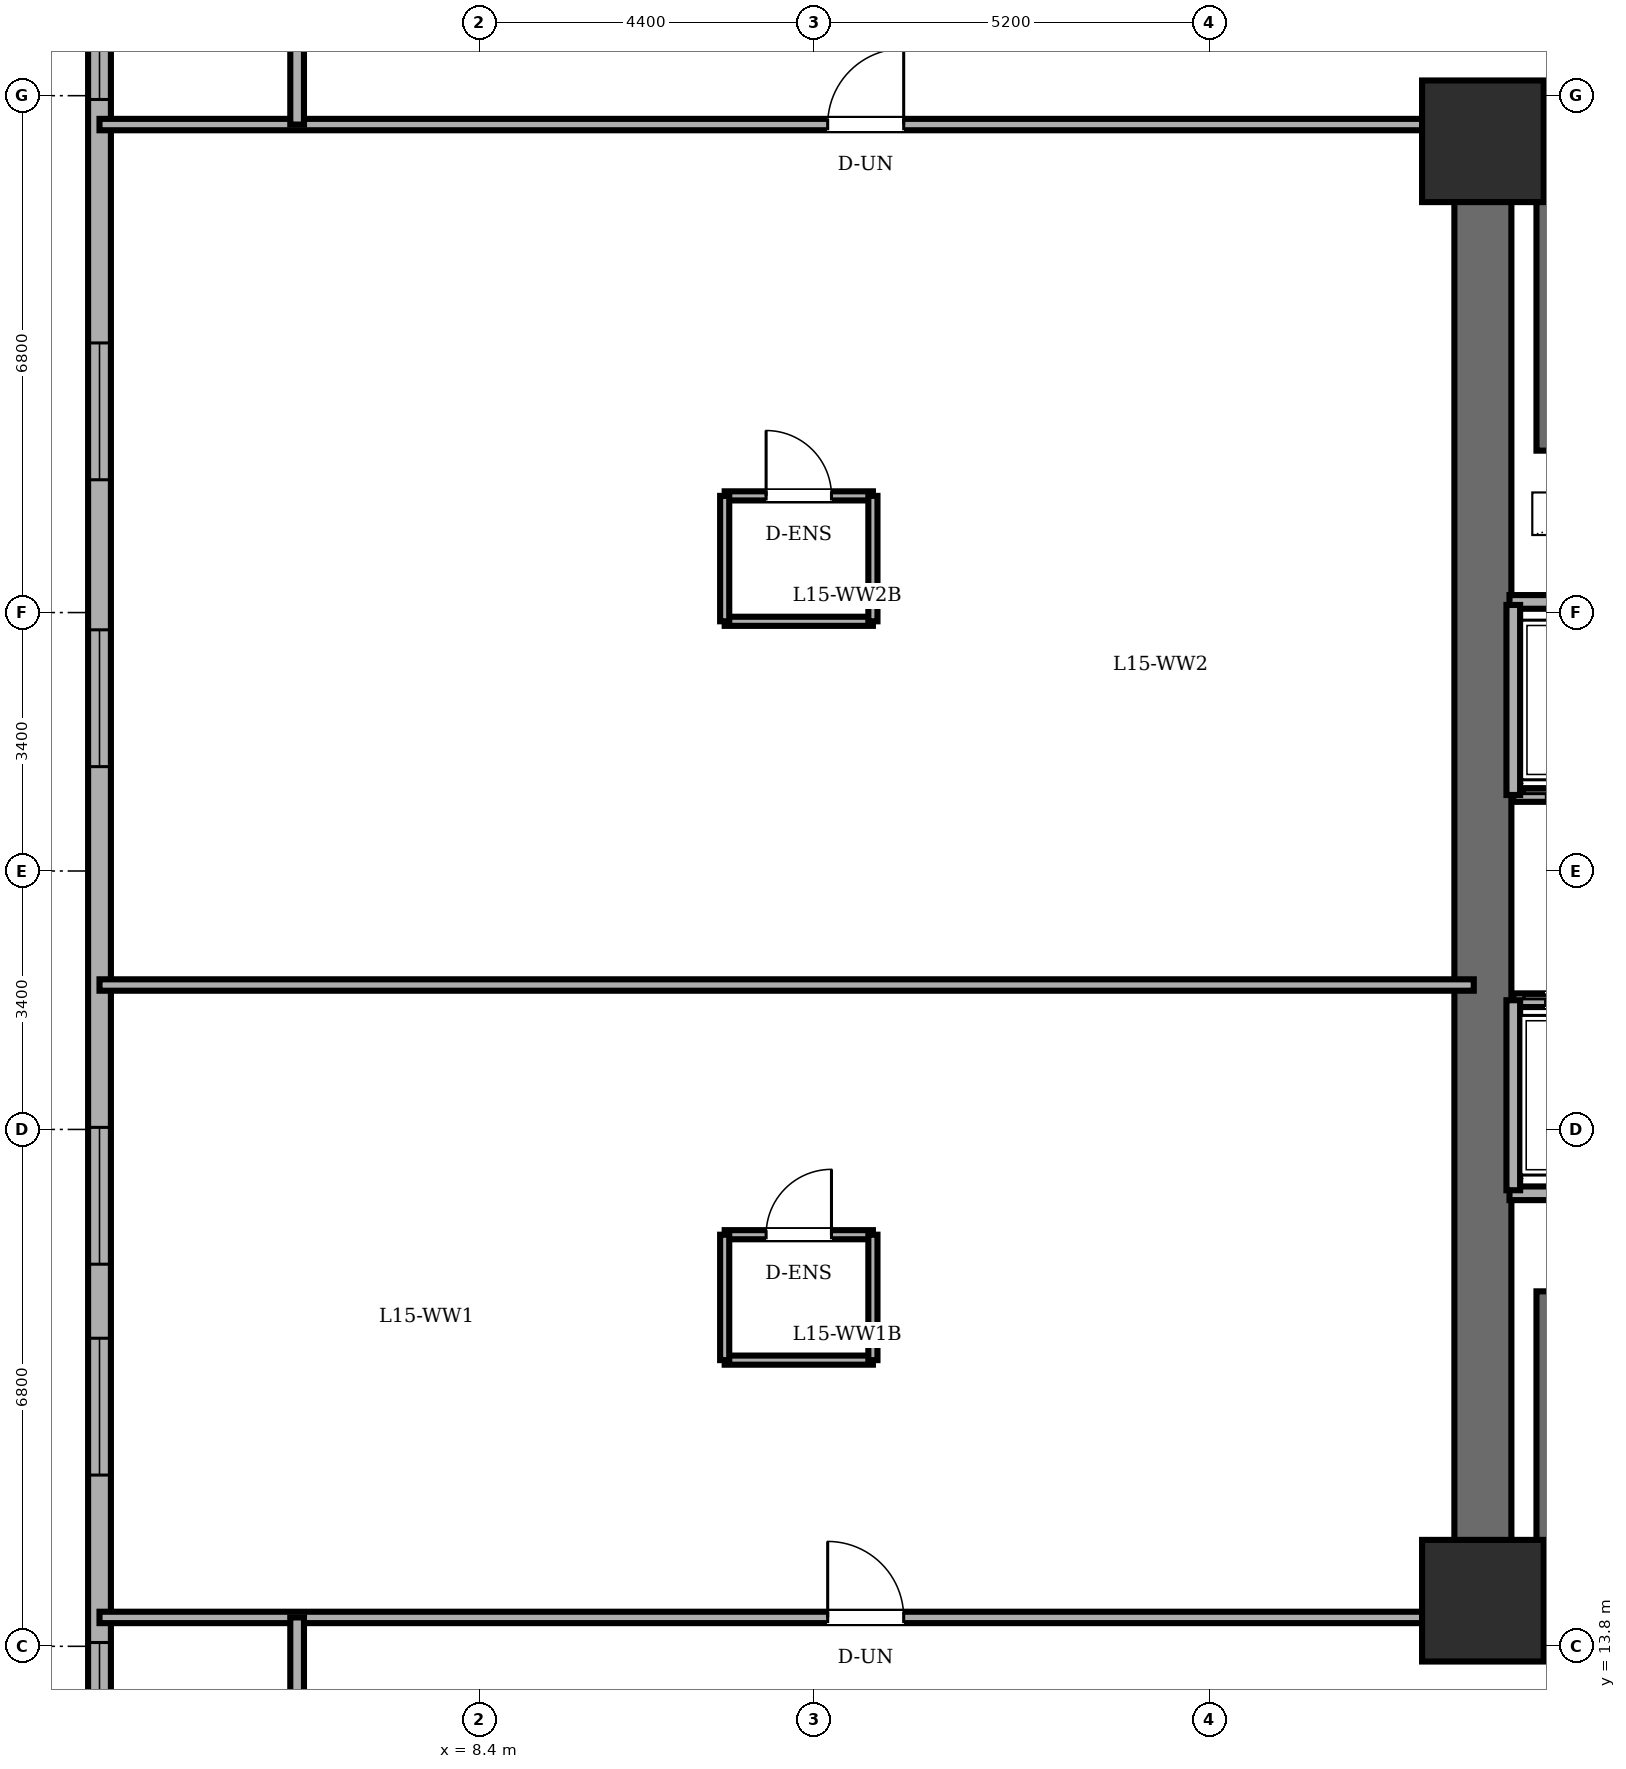
"""IFC4 building model, lengths in metres.
Left out: names, types, materials, properties, quantities, classifications, styles, units other than length and angle.
Written with IfcOpenShell. Run it as: python <this file> out.ifc"""

import sys

from ifc_helpers import new_model, si_unit, direction, frame, frame_2d, origin, origin_2d, place, context, subcontext, project, spatial, rectangle, extrude, element, fill, save


model = new_model("IFC4")
c1 = context("Model", 3, precision=1e-05, world=origin(), true_north=direction((0.0, 1.0)))
c2 = subcontext(c1, "Body", "Model", "MODEL_VIEW")
j1 = project(units=[si_unit("LENGTHUNIT", "METRE"), si_unit("PLANEANGLEUNIT", "RADIAN")], contexts=[c1])
p1 = place(None, origin())
s1 = spatial("IfcSite", under=j1, at=p1, CompositionType="ELEMENT")
p2 = place(p1, origin())
s2 = spatial("IfcBuilding", under=s1, at=p2, CompositionType="ELEMENT")
p3 = place(p2, frame((0.0, 0.0, 57.6)))
s3 = spatial("IfcBuildingStorey", under=s2, at=p3, CompositionType="ELEMENT", Elevation=57.6)
for number, where, z_axis, x_axis in (
    (1, (21.6, 14.4, 0.0), (0.0, 0.0, 1.0), (1.0, 0.0, 0.0)),
    (2, (21.6, 33.6, 0.0), (0.0, 0.0, 1.0), (1.0, 0.0, 0.0)),
):
    element("IfcColumn", number, at=place(p3, frame(where, z_axis=z_axis, x_axis=x_axis)), inside=s3, PredefinedType="COLUMN", context=c2, shape_type="SweptSolid", body=[
        extrude(rectangle(XDim=1.6, YDim=1.6, at=origin_2d()), origin(), (0.0, 0.0, 1.0), 3.6),
    ])
p4 = place(p3, frame((3.4, 40.2, 0.0), z_axis=(0.0, 0.0, 1.0), x_axis=(0.0, -1.0, 0.0)))
e3 = element("IfcWall", 3, at=p4, inside=s3, PredefinedType="SOLIDWALL", context=c2, shape_type="SweptSolid", body=[
    extrude(rectangle(XDim=32.4, YDim=0.3, at=frame_2d((16.2, 0.0))), origin(), (0.0, 0.0, 1.0), 3.4),
])
p5 = place(p4, frame((1.235, 0.0, 0.85)))
e4 = element("IfcOpeningElement", 4, at=p5, cuts=e3, PredefinedType="OPENING", context=c2, shape_type="SweptSolid", body=[
    extrude(rectangle(XDim=1.8, YDim=1.55, at=frame_2d((0.9, 0.775))), frame((0.0, 0.16, 0.0), z_axis=(0.0, -1.0, 0.0), x_axis=(1.0, 0.0, 0.0)), (0.0, 0.0, 1.0), 0.32),
])
p6 = place(p4, frame((4.25, 0.0, 0.85)))
e5 = element("IfcOpeningElement", 5, at=p6, cuts=e3, PredefinedType="OPENING", context=c2, shape_type="SweptSolid", body=[
    extrude(rectangle(XDim=1.8, YDim=1.55, at=frame_2d((0.9, 0.775))), frame((0.0, 0.16, 0.0), z_axis=(0.0, -1.0, 0.0), x_axis=(1.0, 0.0, 0.0)), (0.0, 0.0, 1.0), 0.32),
])
p7 = place(p4, frame((9.253, 0.0, 0.85)))
e6 = element("IfcOpeningElement", 6, at=p7, cuts=e3, PredefinedType="OPENING", context=c2, shape_type="SweptSolid", body=[
    extrude(rectangle(XDim=1.8, YDim=1.55, at=frame_2d((0.9, 0.775))), frame((0.0, 0.16, 0.0), z_axis=(0.0, -1.0, 0.0), x_axis=(1.0, 0.0, 0.0)), (0.0, 0.0, 1.0), 0.32),
])
p8 = place(p4, frame((13.027, 0.0, 0.85)))
e7 = element("IfcOpeningElement", 7, at=p8, cuts=e3, PredefinedType="OPENING", context=c2, shape_type="SweptSolid", body=[
    extrude(rectangle(XDim=1.8, YDim=1.55, at=frame_2d((0.9, 0.775))), frame((0.0, 0.16, 0.0), z_axis=(0.0, -1.0, 0.0), x_axis=(1.0, 0.0, 0.0)), (0.0, 0.0, 1.0), 0.32),
])
p9 = place(p4, frame((19.573, 0.0, 0.85)))
e8 = element("IfcOpeningElement", 8, at=p9, cuts=e3, PredefinedType="OPENING", context=c2, shape_type="SweptSolid", body=[
    extrude(rectangle(XDim=1.8, YDim=1.55, at=frame_2d((0.9, 0.775))), frame((0.0, 0.16, 0.0), z_axis=(0.0, -1.0, 0.0), x_axis=(1.0, 0.0, 0.0)), (0.0, 0.0, 1.0), 0.32),
])
p10 = place(p4, frame((22.347, 0.0, 0.85)))
e9 = element("IfcOpeningElement", 9, at=p10, cuts=e3, PredefinedType="OPENING", context=c2, shape_type="SweptSolid", body=[
    extrude(rectangle(XDim=1.8, YDim=1.55, at=frame_2d((0.9, 0.775))), frame((0.0, 0.16, 0.0), z_axis=(0.0, -1.0, 0.0), x_axis=(1.0, 0.0, 0.0)), (0.0, 0.0, 1.0), 0.32),
])
p11 = place(p4, frame((26.35, 0.0, 0.85)))
e10 = element("IfcOpeningElement", 10, at=p11, cuts=e3, PredefinedType="OPENING", context=c2, shape_type="SweptSolid", body=[
    extrude(rectangle(XDim=1.8, YDim=1.55, at=frame_2d((0.9, 0.775))), frame((0.0, 0.16, 0.0), z_axis=(0.0, -1.0, 0.0), x_axis=(1.0, 0.0, 0.0)), (0.0, 0.0, 1.0), 0.32),
])
p12 = place(p4, frame((29.365, 0.0, 0.85)))
e11 = element("IfcOpeningElement", 11, at=p12, cuts=e3, PredefinedType="OPENING", context=c2, shape_type="SweptSolid", body=[
    extrude(rectangle(XDim=1.8, YDim=1.55, at=frame_2d((0.9, 0.775))), frame((0.0, 0.16, 0.0), z_axis=(0.0, -1.0, 0.0), x_axis=(1.0, 0.0, 0.0)), (0.0, 0.0, 1.0), 0.32),
])
p13 = place(p3, frame((21.6, 14.4, 0.0), z_axis=(0.0, 0.0, 1.0), x_axis=(0.0, 1.0, 0.0)))
e12 = element("IfcWall", 12, at=p13, inside=s3, PredefinedType="SHEAR", context=c2, shape_type="SweptSolid", body=[
    extrude(rectangle(XDim=19.2, YDim=0.75, at=frame_2d((9.6, 0.0))), origin(), (0.0, 0.0, 1.0), 3.4),
])
for number, where, z_axis, x_axis in (
    (13, (21.6, 33.6, 0.0), (0.0, 0.0, 1.0), (1.0, 0.0, 0.0)),
    (14, (37.2, 14.4, 0.0), (0.0, 0.0, 1.0), (-1.0, 0.0, 0.0)),
):
    element("IfcWall", number, at=place(p3, frame(where, z_axis=z_axis, x_axis=x_axis)), inside=s3, PredefinedType="SHEAR", context=c2, shape_type="SweptSolid", body=[
        extrude(rectangle(XDim=15.6, YDim=0.75, at=frame_2d((7.8, 0.0))), origin(), (0.0, 0.0, 1.0), 3.4),
    ])
for number, where, z_axis, x_axis in (
    (15, (22.48, 29.53, 0.0), (0.0, 0.0, 1.0), (0.0, 1.0, 0.0)),
    (16, (22.48, 14.89, 0.0), (0.0, 0.0, 1.0), (0.0, 1.0, 0.0)),
):
    element("IfcWall", number, at=place(p3, frame(where, z_axis=z_axis, x_axis=x_axis)), inside=s3, PredefinedType="SOLIDWALL", context=c2, shape_type="SweptSolid", body=[
        extrude(rectangle(XDim=3.58, YDim=0.35, at=frame_2d((1.79, 0.0))), origin(), (0.0, 0.0, 1.0), 3.4),
    ])
p14 = place(p3, frame((21.95, 27.54, 0.0), z_axis=(0.0, 0.0, 1.0), x_axis=(1.0, 0.0, 0.0)))
e17 = element("IfcWall", 17, at=p14, inside=s3, PredefinedType="PARTITIONING", context=c2, shape_type="SweptSolid", body=[
    extrude(rectangle(XDim=10.56, YDim=0.18, at=frame_2d((5.28, 0.0))), origin(), (0.0, 0.0, 1.0), 3.4),
])
p15 = place(p3, frame((21.95, 19.76, 0.0), z_axis=(0.0, 0.0, 1.0), x_axis=(1.0, 0.0, 0.0)))
e18 = element("IfcWall", 18, at=p15, inside=s3, PredefinedType="PARTITIONING", context=c2, shape_type="SweptSolid", body=[
    extrude(rectangle(XDim=14.87, YDim=0.18, at=frame_2d((7.435, 0.0))), origin(), (0.0, 0.0, 1.0), 3.4),
])
p16 = place(p3, frame((24.02, 25.0, 0.0), z_axis=(0.0, 0.0, 1.0), x_axis=(-1.0, 0.0, 0.0)))
e19 = element("IfcWall", 19, at=p16, inside=s3, PredefinedType="PARTITIONING", context=c2, shape_type="SweptSolid", body=[
    extrude(rectangle(XDim=2.02, YDim=0.18, at=frame_2d((1.01, 0.0))), origin(), (0.0, 0.0, 1.0), 3.4),
])
p17 = place(p16, frame((0.435, 0.0, 0.0)))
e20 = element("IfcOpeningElement", 20, at=p17, cuts=e19, PredefinedType="OPENING", context=c2, shape_type="SweptSolid", body=[
    extrude(rectangle(XDim=1.15, YDim=2.2, at=frame_2d((0.575, 1.1))), frame((0.0, 0.1, 0.0), z_axis=(0.0, -1.0, 0.0), x_axis=(1.0, 0.0, 0.0)), (0.0, 0.0, 1.0), 0.2),
])
p18 = place(p3, frame((22.0, 27.5, 0.0), z_axis=(0.0, 0.0, 1.0), x_axis=(0.0, -1.0, 0.0)))
e21 = element("IfcWall", 21, at=p18, inside=s3, PredefinedType="PARTITIONING", context=c2, shape_type="SweptSolid", body=[
    extrude(rectangle(XDim=2.5, YDim=0.18, at=frame_2d((1.25, 0.0))), origin(), (0.0, 0.0, 1.0), 3.4),
])
p19 = place(p3, frame((22.0, 22.3, 0.0), z_axis=(0.0, 0.0, 1.0), x_axis=(1.0, 0.0, 0.0)))
e22 = element("IfcWall", 22, at=p19, inside=s3, PredefinedType="PARTITIONING", context=c2, shape_type="SweptSolid", body=[
    extrude(rectangle(XDim=2.0, YDim=0.18, at=frame_2d((1.0, 0.0))), origin(), (0.0, 0.0, 1.0), 3.4),
])
p20 = place(p19, frame((0.425, 0.0, 0.0)))
e23 = element("IfcOpeningElement", 23, at=p20, cuts=e22, PredefinedType="OPENING", context=c2, shape_type="SweptSolid", body=[
    extrude(rectangle(XDim=1.15, YDim=2.2, at=frame_2d((0.575, 1.1))), frame((0.0, 0.1, 0.0), z_axis=(0.0, -1.0, 0.0), x_axis=(1.0, 0.0, 0.0)), (0.0, 0.0, 1.0), 0.2),
])
p21 = place(p3, frame((22.0, 22.3, 0.0), z_axis=(0.0, 0.0, 1.0), x_axis=(0.0, -1.0, 0.0)))
e24 = element("IfcWall", 24, at=p21, inside=s3, PredefinedType="PARTITIONING", context=c2, shape_type="SweptSolid", body=[
    extrude(rectangle(XDim=2.5, YDim=0.18, at=frame_2d((1.25, 0.0))), origin(), (0.0, 0.0, 1.0), 3.4),
])
p22 = place(p3, frame((11.625, 19.215, 0.0), z_axis=(0.0, 0.0, 1.0), x_axis=(1.0, 0.0, 0.0)))
e25 = element("IfcWall", 25, at=p22, inside=s3, PredefinedType="PARTITIONING", context=c2, shape_type="SweptSolid", body=[
    extrude(rectangle(XDim=1.95, YDim=0.12, at=frame_2d((0.975, 0.0))), origin(), (0.0, 0.0, 1.0), 3.4),
])
p23 = place(p22, frame((0.545, 0.0, 0.0)))
e26 = element("IfcOpeningElement", 26, at=p23, cuts=e25, PredefinedType="OPENING", context=c2, shape_type="SweptSolid", body=[
    extrude(rectangle(XDim=0.86, YDim=2.1, at=frame_2d((0.43, 1.05))), frame((0.0, 0.07, 0.0), z_axis=(0.0, -1.0, 0.0), x_axis=(1.0, 0.0, 0.0)), (0.0, 0.0, 1.0), 0.14),
])
p24 = place(p3, frame((13.575, 17.565, 0.0), z_axis=(0.0, 0.0, 1.0), x_axis=(-1.0, 0.0, 0.0)))
e27 = element("IfcWall", 27, at=p24, inside=s3, PredefinedType="PARTITIONING", context=c2, shape_type="SweptSolid", body=[
    extrude(rectangle(XDim=1.95, YDim=0.12, at=frame_2d((0.975, 0.0))), origin(), (0.0, 0.0, 1.0), 3.4),
])
for number, where, z_axis, x_axis in (
    (28, (11.625, 19.215, 0.0), (0.0, 0.0, 1.0), (0.0, -1.0, 0.0)),
    (29, (13.575, 17.565, 0.0), (0.0, 0.0, 1.0), (0.0, 1.0, 0.0)),
):
    element("IfcWall", number, at=place(p3, frame(where, z_axis=z_axis, x_axis=x_axis)), inside=s3, PredefinedType="PARTITIONING", context=c2, shape_type="SweptSolid", body=[
        extrude(rectangle(XDim=1.65, YDim=0.12, at=frame_2d((0.825, 0.0))), origin(), (0.0, 0.0, 1.0), 3.4),
    ])
p25 = place(p3, frame((11.625, 28.935, 0.0), z_axis=(0.0, 0.0, 1.0), x_axis=(1.0, 0.0, 0.0)))
e30 = element("IfcWall", 30, at=p25, inside=s3, PredefinedType="PARTITIONING", context=c2, shape_type="SweptSolid", body=[
    extrude(rectangle(XDim=1.95, YDim=0.12, at=frame_2d((0.975, 0.0))), origin(), (0.0, 0.0, 1.0), 3.4),
])
p26 = place(p25, frame((0.545, 0.0, 0.0)))
e31 = element("IfcOpeningElement", 31, at=p26, cuts=e30, PredefinedType="OPENING", context=c2, shape_type="SweptSolid", body=[
    extrude(rectangle(XDim=0.86, YDim=2.1, at=frame_2d((0.43, 1.05))), frame((0.0, 0.07, 0.0), z_axis=(0.0, -1.0, 0.0), x_axis=(1.0, 0.0, 0.0)), (0.0, 0.0, 1.0), 0.14),
])
p27 = place(p3, frame((13.575, 27.285, 0.0), z_axis=(0.0, 0.0, 1.0), x_axis=(-1.0, 0.0, 0.0)))
e32 = element("IfcWall", 32, at=p27, inside=s3, PredefinedType="PARTITIONING", context=c2, shape_type="SweptSolid", body=[
    extrude(rectangle(XDim=1.95, YDim=0.12, at=frame_2d((0.975, 0.0))), origin(), (0.0, 0.0, 1.0), 3.4),
])
for number, where, z_axis, x_axis in (
    (33, (11.625, 28.935, 0.0), (0.0, 0.0, 1.0), (0.0, -1.0, 0.0)),
    (34, (13.575, 27.285, 0.0), (0.0, 0.0, 1.0), (0.0, 1.0, 0.0)),
):
    element("IfcWall", number, at=place(p3, frame(where, z_axis=z_axis, x_axis=x_axis)), inside=s3, PredefinedType="PARTITIONING", context=c2, shape_type="SweptSolid", body=[
        extrude(rectangle(XDim=1.65, YDim=0.12, at=frame_2d((0.825, 0.0))), origin(), (0.0, 0.0, 1.0), 3.4),
    ])
p28 = place(p3, frame((3.4, 14.18, 0.0), z_axis=(0.0, 0.0, 1.0), x_axis=(1.0, 0.0, 0.0)))
e35 = element("IfcWall", 35, at=p28, inside=s3, PredefinedType="PARTITIONING", context=c2, shape_type="SweptSolid", body=[
    extrude(rectangle(XDim=18.08, YDim=0.15, at=frame_2d((9.04, 0.0))), origin(), (0.0, 0.0, 1.0), 3.4),
])
p29 = place(p28, frame((9.58, 0.0, 0.0)))
e36 = element("IfcOpeningElement", 36, at=p29, cuts=e35, PredefinedType="OPENING", context=c2, shape_type="SweptSolid", body=[
    extrude(rectangle(XDim=1.0, YDim=2.15, at=frame_2d((0.5, 1.075))), frame((0.0, 0.085, 0.0), z_axis=(0.0, -1.0, 0.0), x_axis=(1.0, 0.0, 0.0)), (0.0, 0.0, 1.0), 0.17),
])
p30 = place(p3, frame((3.4, 22.5, 0.0), z_axis=(0.0, 0.0, 1.0), x_axis=(1.0, 0.0, 0.0)))
e37 = element("IfcWall", 37, at=p30, inside=s3, PredefinedType="PARTITIONING", context=c2, shape_type="SweptSolid", body=[
    extrude(rectangle(XDim=18.08, YDim=0.15, at=frame_2d((9.04, 0.0))), origin(), (0.0, 0.0, 1.0), 3.4),
])
p31 = place(p3, frame((3.4, 33.82, 0.0), z_axis=(0.0, 0.0, 1.0), x_axis=(1.0, 0.0, 0.0)))
e38 = element("IfcWall", 38, at=p31, inside=s3, PredefinedType="PARTITIONING", context=c2, shape_type="SweptSolid", body=[
    extrude(rectangle(XDim=18.08, YDim=0.15, at=frame_2d((9.04, 0.0))), origin(), (0.0, 0.0, 1.0), 3.4),
])
p32 = place(p31, frame((9.58, 0.0, 0.0)))
e39 = element("IfcOpeningElement", 39, at=p32, cuts=e38, PredefinedType="OPENING", context=c2, shape_type="SweptSolid", body=[
    extrude(rectangle(XDim=1.0, YDim=2.15, at=frame_2d((0.5, 1.075))), frame((0.0, 0.085, 0.0), z_axis=(0.0, -1.0, 0.0), x_axis=(1.0, 0.0, 0.0)), (0.0, 0.0, 1.0), 0.17),
])
for number, where, z_axis, x_axis in (
    (40, (6.0, 11.72, 0.0), (0.0, 0.0, 1.0), (0.0, 1.0, 0.0)),
    (41, (6.0, 33.82, 0.0), (0.0, 0.0, 1.0), (0.0, 1.0, 0.0)),
):
    element("IfcWall", number, at=place(p3, frame(where, z_axis=z_axis, x_axis=x_axis)), inside=s3, PredefinedType="PARTITIONING", context=c2, shape_type="SweptSolid", body=[
        extrude(rectangle(XDim=2.46, YDim=0.18, at=frame_2d((1.23, 0.0))), origin(), (0.0, 0.0, 1.0), 3.4),
    ])
p33 = place(p6, origin())
e42 = element("IfcWindow", 42, at=p33, inside=s3, PartitioningType="DOUBLE_PANEL_VERTICAL", PredefinedType="WINDOW", context=c2, shape_type="SweptSolid", body=[
    extrude(rectangle(XDim=1.8, YDim=1.55, at=frame_2d((0.9, 0.775))), frame((0.0, 0.03, 0.0), z_axis=(0.0, -1.0, 0.0), x_axis=(1.0, 0.0, 0.0)), (0.0, 0.0, 1.0), 0.06),
])
fill(e5, e42)
p34 = place(p7, origin())
e43 = element("IfcWindow", 43, at=p34, inside=s3, PartitioningType="DOUBLE_PANEL_VERTICAL", PredefinedType="WINDOW", context=c2, shape_type="SweptSolid", body=[
    extrude(rectangle(XDim=1.8, YDim=1.55, at=frame_2d((0.9, 0.775))), frame((0.0, 0.03, 0.0), z_axis=(0.0, -1.0, 0.0), x_axis=(1.0, 0.0, 0.0)), (0.0, 0.0, 1.0), 0.06),
])
fill(e6, e43)
p35 = place(p8, origin())
e44 = element("IfcWindow", 44, at=p35, inside=s3, PartitioningType="DOUBLE_PANEL_VERTICAL", PredefinedType="WINDOW", context=c2, shape_type="SweptSolid", body=[
    extrude(rectangle(XDim=1.8, YDim=1.55, at=frame_2d((0.9, 0.775))), frame((0.0, 0.03, 0.0), z_axis=(0.0, -1.0, 0.0), x_axis=(1.0, 0.0, 0.0)), (0.0, 0.0, 1.0), 0.06),
])
fill(e7, e44)
p36 = place(p9, origin())
e45 = element("IfcWindow", 45, at=p36, inside=s3, PartitioningType="DOUBLE_PANEL_VERTICAL", PredefinedType="WINDOW", context=c2, shape_type="SweptSolid", body=[
    extrude(rectangle(XDim=1.8, YDim=1.55, at=frame_2d((0.9, 0.775))), frame((0.0, 0.03, 0.0), z_axis=(0.0, -1.0, 0.0), x_axis=(1.0, 0.0, 0.0)), (0.0, 0.0, 1.0), 0.06),
])
fill(e8, e45)
p37 = place(p10, origin())
e46 = element("IfcWindow", 46, at=p37, inside=s3, PartitioningType="DOUBLE_PANEL_VERTICAL", PredefinedType="WINDOW", context=c2, shape_type="SweptSolid", body=[
    extrude(rectangle(XDim=1.8, YDim=1.55, at=frame_2d((0.9, 0.775))), frame((0.0, 0.03, 0.0), z_axis=(0.0, -1.0, 0.0), x_axis=(1.0, 0.0, 0.0)), (0.0, 0.0, 1.0), 0.06),
])
fill(e9, e46)
p38 = place(p11, origin())
e47 = element("IfcWindow", 47, at=p38, inside=s3, PartitioningType="DOUBLE_PANEL_VERTICAL", PredefinedType="WINDOW", context=c2, shape_type="SweptSolid", body=[
    extrude(rectangle(XDim=1.8, YDim=1.55, at=frame_2d((0.9, 0.775))), frame((0.0, 0.03, 0.0), z_axis=(0.0, -1.0, 0.0), x_axis=(1.0, 0.0, 0.0)), (0.0, 0.0, 1.0), 0.06),
])
fill(e10, e47)
p39 = place(p20, origin())
e48 = element("IfcDoor", 48, at=p39, inside=s3, OperationType="DOUBLE_DOOR_SLIDING", PredefinedType="DOOR", context=c2, shape_type="SweptSolid", body=[
    extrude(rectangle(XDim=1.15, YDim=2.2, at=frame_2d((0.575, 1.1))), frame((0.0, 0.025, 0.0), z_axis=(0.0, -1.0, 0.0), x_axis=(1.0, 0.0, 0.0)), (0.0, 0.0, 1.0), 0.05),
])
fill(e23, e48)
p40 = place(p23, origin())
e49 = element("IfcDoor", 49, at=p40, inside=s3, OperationType="SINGLE_SWING_RIGHT", PredefinedType="DOOR", context=c2, shape_type="SweptSolid", body=[
    extrude(rectangle(XDim=0.86, YDim=2.1, at=frame_2d((0.43, 1.05))), frame((0.0, 0.025, 0.0), z_axis=(0.0, -1.0, 0.0), x_axis=(1.0, 0.0, 0.0)), (0.0, 0.0, 1.0), 0.05),
])
fill(e26, e49)
p41 = place(p26, origin())
e50 = element("IfcDoor", 50, at=p41, inside=s3, OperationType="SINGLE_SWING_LEFT", PredefinedType="DOOR", context=c2, shape_type="SweptSolid", body=[
    extrude(rectangle(XDim=0.86, YDim=2.1, at=frame_2d((0.43, 1.05))), frame((0.0, 0.025, 0.0), z_axis=(0.0, -1.0, 0.0), x_axis=(1.0, 0.0, 0.0)), (0.0, 0.0, 1.0), 0.05),
])
fill(e31, e50)
p42 = place(p29, origin())
e51 = element("IfcDoor", 51, at=p42, inside=s3, OperationType="SINGLE_SWING_LEFT", PredefinedType="DOOR", context=c2, shape_type="SweptSolid", body=[
    extrude(rectangle(XDim=1.0, YDim=2.15, at=frame_2d((0.5, 1.075))), frame((0.0, 0.025, 0.0), z_axis=(0.0, -1.0, 0.0), x_axis=(1.0, 0.0, 0.0)), (0.0, 0.0, 1.0), 0.05),
])
fill(e36, e51)
p43 = place(p32, origin())
e52 = element("IfcDoor", 52, at=p43, inside=s3, OperationType="SINGLE_SWING_RIGHT", PredefinedType="DOOR", context=c2, shape_type="SweptSolid", body=[
    extrude(rectangle(XDim=1.0, YDim=2.15, at=frame_2d((0.5, 1.075))), frame((0.0, 0.025, 0.0), z_axis=(0.0, -1.0, 0.0), x_axis=(1.0, 0.0, 0.0)), (0.0, 0.0, 1.0), 0.05),
])
fill(e39, e52)
save(model, sys.argv[1])
